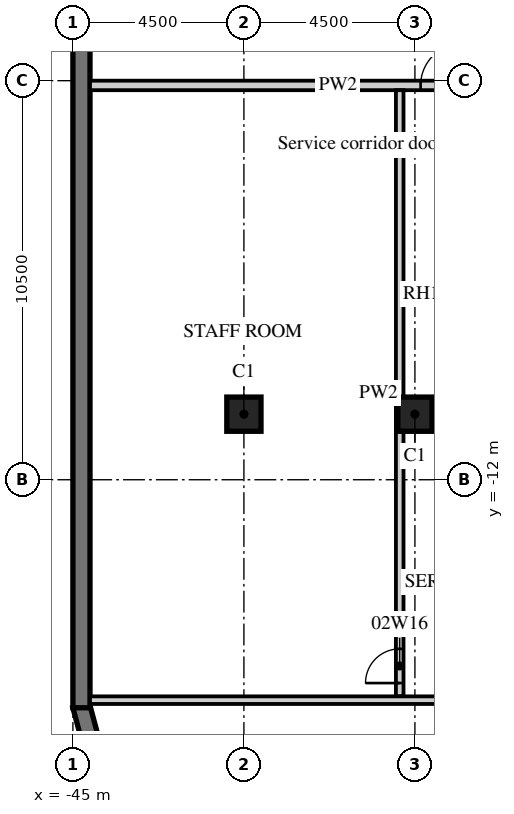
"""IFC4 building model, lengths in metres.
Left out: names, types, materials, properties, quantities, classifications, styles, units other than length and angle.
Written with IfcOpenShell. Run it as: python <this file> out.ifc"""

import sys

from ifc_helpers import new_model, si_unit, direction, frame, frame_2d, origin, origin_2d, place, context, subcontext, project, spatial, polyline, rectangle, outline, extrude, element, fill, save


model = new_model("IFC4")
c1 = context("Model", 3, precision=1e-05, world=origin(), true_north=direction((0.0, 1.0)))
c2 = subcontext(c1, "Body", "Model", "MODEL_VIEW")
j1 = project(units=[si_unit("LENGTHUNIT", "METRE"), si_unit("PLANEANGLEUNIT", "RADIAN")], contexts=[c1])
p1 = place(None, origin())
s1 = spatial("IfcSite", under=j1, at=p1, CompositionType="ELEMENT")
p2 = place(p1, origin())
s2 = spatial("IfcBuilding", under=s1, at=p2, CompositionType="ELEMENT")
p3 = place(p2, frame((0.0, 0.0, 17.0)))
s3 = spatial("IfcBuildingStorey", under=s2, at=p3, CompositionType="ELEMENT", Elevation=17.0)
for number, where, z_axis, x_axis in (
    (1, (-40.5, -10.275, 0.0), (0.0, 0.0, 1.0), (1.0, 0.0, 0.0)),
    (2, (-36.0, -10.275, 0.0), (0.0, 0.0, 1.0), (1.0, 0.0, 0.0)),
):
    element("IfcColumn", number, at=place(p3, frame(where, z_axis=z_axis, x_axis=x_axis)), inside=s3, PredefinedType="COLUMN", context=c2, shape_type="SweptSolid", body=[
        extrude(rectangle(XDim=0.9, YDim=0.9, at=origin_2d()), origin(), (0.0, 0.0, 1.0), 6.5),
    ])
p4 = place(p3, frame((-44.783, -17.942, 0.0), z_axis=(0.0, 0.0, 1.0), x_axis=(0.25881466832, -0.965926999034, 0.0)))
e3 = element("IfcWall", 3, at=p4, inside=s3, PredefinedType="SOLIDWALL", context=c2, shape_type="SweptSolid", body=[
    extrude(outline(polyline([(0.0, -0.225), (2.071, -0.225), (1.95, 0.225), (0.121, 0.225), (0.0, -0.225)])), origin(), (0.0, 0.0, 1.0), 6.05),
])
p5 = place(p3, frame((-44.775, 18.0, 0.0), z_axis=(0.0, 0.0, 1.0), x_axis=(0.0, -1.0, 0.0)))
e4 = element("IfcWall", 4, at=p5, inside=s3, PredefinedType="SOLIDWALL", context=c2, shape_type="SweptSolid", body=[
    extrude(rectangle(XDim=36.0, YDim=0.45, at=frame_2d((18.0, 0.0))), origin(), (0.0, 0.0, 1.0), 6.05),
])
p6 = place(p5, frame((4.05, 0.0, 0.9)))
e5 = element("IfcOpeningElement", 5, at=p6, cuts=e4, PredefinedType="OPENING", context=c2, shape_type="SweptSolid", body=[
    extrude(rectangle(XDim=3.0, YDim=1.8, at=frame_2d((1.5, 0.9))), frame((0.0, 0.235, 0.0), z_axis=(0.0, -1.0, 0.0), x_axis=(1.0, 0.0, 0.0)), (0.0, 0.0, 1.0), 0.47),
])
p7 = place(p3, frame((-44.55, -1.625, 0.0), z_axis=(0.0, 0.0, 1.0), x_axis=(1.0, 0.0, 0.0)))
e6 = element("IfcWall", 6, at=p7, inside=s3, PredefinedType="PARTITIONING", context=c2, shape_type="SweptSolid", body=[
    extrude(rectangle(XDim=13.05, YDim=0.25, at=frame_2d((6.525, 0.0))), origin(), (0.0, 0.0, 1.0), 6.05),
])
p8 = place(p7, frame((11.125, 0.0, 0.0)))
e7 = element("IfcOpeningElement", 7, at=p8, cuts=e6, PredefinedType="OPENING", context=c2, shape_type="SweptSolid", body=[
    extrude(rectangle(XDim=1.3, YDim=2.1, at=frame_2d((0.65, 1.05))), frame((0.0, 0.135, 0.0), z_axis=(0.0, -1.0, 0.0), x_axis=(1.0, 0.0, 0.0)), (0.0, 0.0, 1.0), 0.27),
])
p9 = place(p7, frame((8.7, 0.0, 0.0)))
e8 = element("IfcOpeningElement", 8, at=p9, cuts=e6, PredefinedType="OPENING", context=c2, shape_type="SweptSolid", body=[
    extrude(rectangle(XDim=1.1, YDim=2.1, at=frame_2d((0.55, 1.05))), frame((0.0, 0.135, 0.0), z_axis=(0.0, -1.0, 0.0), x_axis=(1.0, 0.0, 0.0)), (0.0, 0.0, 1.0), 0.27),
])
p10 = place(p3, frame((-36.4, -17.7, 0.0), z_axis=(0.0, 0.0, 1.0), x_axis=(0.0, 1.0, 0.0)))
e9 = element("IfcWall", 9, at=p10, inside=s3, PredefinedType="PARTITIONING", context=c2, shape_type="SweptSolid", body=[
    extrude(rectangle(XDim=15.95, YDim=0.2, at=frame_2d((7.975, 0.0))), origin(), (0.0, 0.0, 1.0), 6.05),
])
p11 = place(p10, frame((0.35, 0.0, 0.0)))
e10 = element("IfcOpeningElement", 10, at=p11, cuts=e9, PredefinedType="OPENING", context=c2, shape_type="SweptSolid", body=[
    extrude(rectangle(XDim=0.9, YDim=2.1, at=frame_2d((0.45, 1.05))), frame((0.0, 0.11, 0.0), z_axis=(0.0, -1.0, 0.0), x_axis=(1.0, 0.0, 0.0)), (0.0, 0.0, 1.0), 0.22),
])
p12 = place(p3, frame((-44.55, -17.8, 0.0), z_axis=(0.0, 0.0, 1.0), x_axis=(1.0, 0.0, 0.0)))
e11 = element("IfcWall", 11, at=p12, inside=s3, PredefinedType="PARTITIONING", context=c2, shape_type="SweptSolid", body=[
    extrude(rectangle(XDim=30.95, YDim=0.2, at=frame_2d((15.475, 0.0))), origin(), (0.0, 0.0, 1.0), 6.05),
])
p13 = place(p12, frame((12.238, 0.0, 0.0)))
e12 = element("IfcOpeningElement", 12, at=p13, cuts=e11, PredefinedType="OPENING", context=c2, shape_type="SweptSolid", body=[
    extrude(rectangle(XDim=0.9, YDim=2.1, at=frame_2d((0.45, 1.05))), frame((0.0, 0.11, 0.0), z_axis=(0.0, -1.0, 0.0), x_axis=(1.0, 0.0, 0.0)), (0.0, 0.0, 1.0), 0.22),
])
p14 = place(p12, frame((20.538, 0.0, 0.0)))
e13 = element("IfcOpeningElement", 13, at=p14, cuts=e11, PredefinedType="OPENING", context=c2, shape_type="SweptSolid", body=[
    extrude(rectangle(XDim=0.9, YDim=2.1, at=frame_2d((0.45, 1.05))), frame((0.0, 0.11, 0.0), z_axis=(0.0, -1.0, 0.0), x_axis=(1.0, 0.0, 0.0)), (0.0, 0.0, 1.0), 0.22),
])
p15 = place(p9, origin())
e14 = element("IfcDoor", 14, at=p15, inside=s3, OperationType="SINGLE_SWING_RIGHT", PredefinedType="DOOR", context=c2, shape_type="SweptSolid", body=[
    extrude(rectangle(XDim=1.1, YDim=2.1, at=frame_2d((0.55, 1.05))), frame((0.0, 0.025, 0.0), z_axis=(0.0, -1.0, 0.0), x_axis=(1.0, 0.0, 0.0)), (0.0, 0.0, 1.0), 0.05),
])
fill(e8, e14)
p16 = place(p11, origin())
e15 = element("IfcDoor", 15, at=p16, inside=s3, OperationType="SINGLE_SWING_LEFT", PredefinedType="DOOR", context=c2, shape_type="SweptSolid", body=[
    extrude(rectangle(XDim=0.9, YDim=2.1, at=frame_2d((0.45, 1.05))), frame((0.0, 0.025, 0.0), z_axis=(0.0, -1.0, 0.0), x_axis=(1.0, 0.0, 0.0)), (0.0, 0.0, 1.0), 0.05),
])
fill(e10, e15)
save(model, sys.argv[1])
